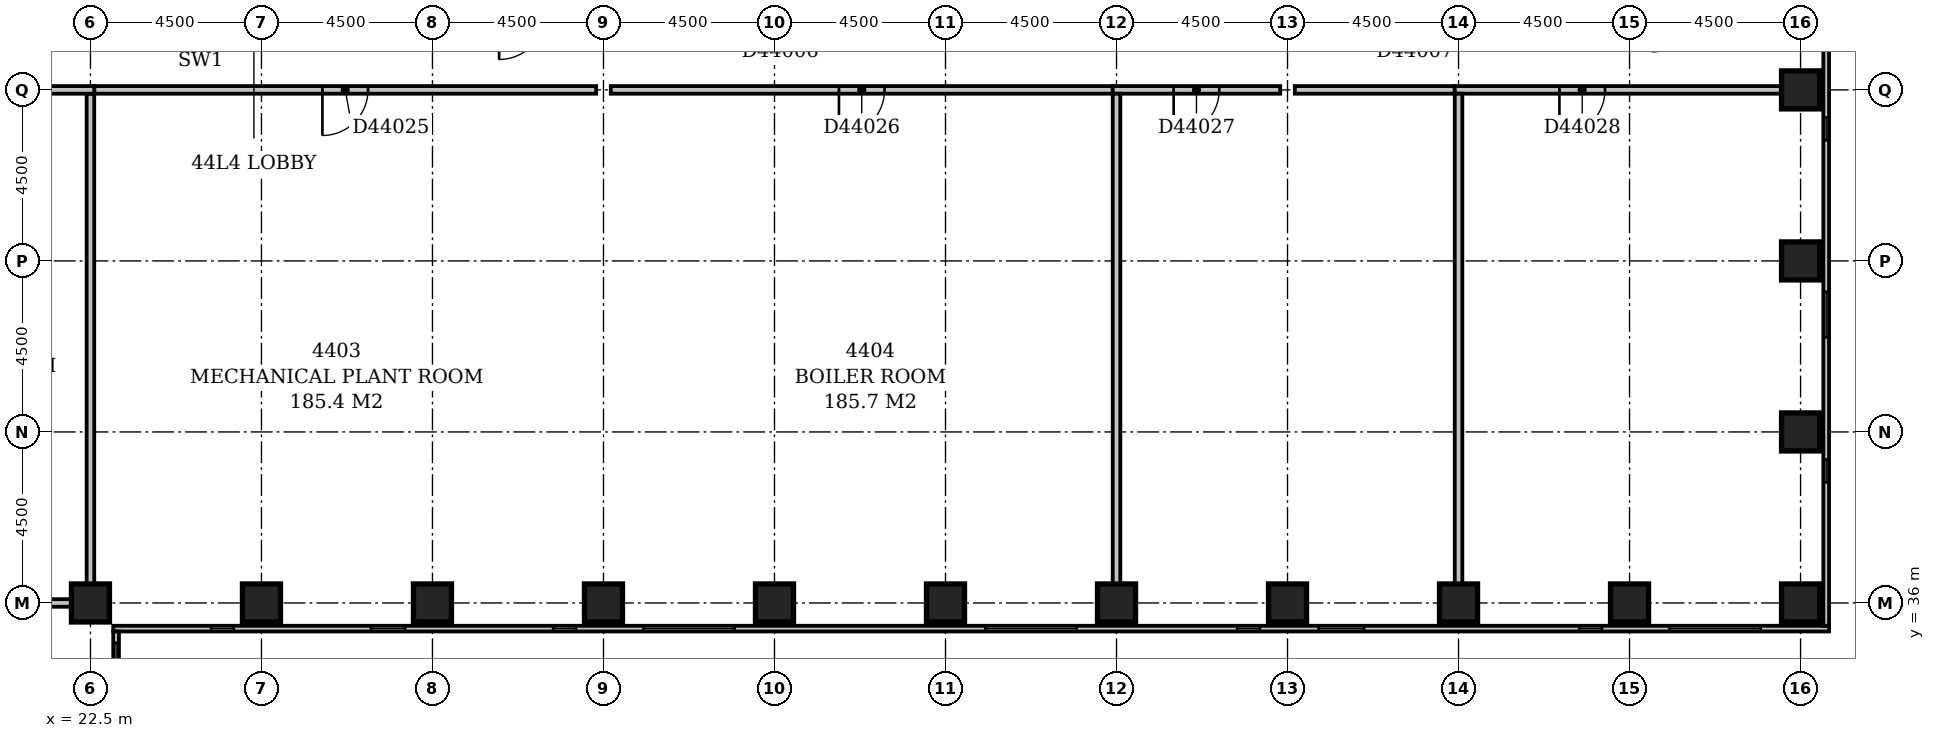
"""IFC4 building model, lengths in metres.
Left out: names, types, materials, properties, quantities, classifications, styles, units other than length and angle.
Written with IfcOpenShell. Run it as: python <this file> out.ifc"""

import sys

from ifc_helpers import new_model, si_unit, direction, frame, frame_2d, origin, origin_2d, place, context, subcontext, project, spatial, rectangle, extrude, element, fill, save


model = new_model("IFC4")
c1 = context("Model", 3, precision=1e-05, world=origin(), true_north=direction((0.0, 1.0)))
c2 = subcontext(c1, "Body", "Model", "MODEL_VIEW")
j1 = project(units=[si_unit("LENGTHUNIT", "METRE"), si_unit("PLANEANGLEUNIT", "RADIAN")], contexts=[c1])
p1 = place(None, origin())
s1 = spatial("IfcSite", under=j1, at=p1, CompositionType="ELEMENT")
p2 = place(p1, origin())
s2 = spatial("IfcBuilding", under=s1, at=p2, CompositionType="ELEMENT")
p3 = place(p2, frame((0.0, 0.0, 173.6)))
s3 = spatial("IfcBuildingStorey", under=s2, at=p3, CompositionType="ELEMENT", Elevation=173.6)
for number, where, z_axis, x_axis in (
    (1, (22.5, 36.0, -0.45), (0.0, 0.0, 1.0), (1.0, 0.0, 0.0)),
    (2, (27.0, 36.0, -0.45), (0.0, 0.0, 1.0), (1.0, 0.0, 0.0)),
    (3, (31.5, 36.0, -0.45), (0.0, 0.0, 1.0), (1.0, 0.0, 0.0)),
    (4, (36.0, 36.0, -0.45), (0.0, 0.0, 1.0), (1.0, 0.0, 0.0)),
    (5, (40.5, 36.0, -0.45), (0.0, 0.0, 1.0), (1.0, 0.0, 0.0)),
    (6, (45.0, 36.0, -0.45), (0.0, 0.0, 1.0), (1.0, 0.0, 0.0)),
    (7, (49.5, 36.0, -0.45), (0.0, 0.0, 1.0), (1.0, 0.0, 0.0)),
    (8, (54.0, 36.0, -0.45), (0.0, 0.0, 1.0), (1.0, 0.0, 0.0)),
    (9, (58.5, 36.0, -0.45), (0.0, 0.0, 1.0), (1.0, 0.0, 0.0)),
    (10, (63.0, 36.0, -0.45), (0.0, 0.0, 1.0), (1.0, 0.0, 0.0)),
    (11, (67.5, 36.0, -0.45), (0.0, 0.0, 1.0), (1.0, 0.0, 0.0)),
    (12, (67.5, 40.5, -0.45), (0.0, 0.0, 1.0), (1.0, 0.0, 0.0)),
    (13, (67.5, 45.0, -0.45), (0.0, 0.0, 1.0), (1.0, 0.0, 0.0)),
    (14, (67.5, 49.5, -0.45), (0.0, 0.0, 1.0), (1.0, 0.0, 0.0)),
):
    element("IfcColumn", number, at=place(p3, frame(where, z_axis=z_axis, x_axis=x_axis)), inside=s3, PredefinedType="COLUMN", context=c2, shape_type="SweptSolid", body=[
        extrude(rectangle(XDim=1.0, YDim=1.0, at=origin_2d()), origin(), (0.0, 0.0, 1.0), 5.55),
    ])
p4 = place(p3, frame((23.175, 17.4, 0.0), z_axis=(0.0, 0.0, 1.0), x_axis=(0.0, 1.0, 0.0)))
e15 = element("IfcWall", 15, at=p4, inside=s3, PredefinedType="STANDARD", context=c2, shape_type="SweptSolid", body=[
    extrude(rectangle(XDim=17.85, YDim=0.15, at=frame_2d((8.925, 0.0))), origin(), (0.0, 0.0, 1.0), 4.5),
])
p5 = place(p4, frame((3.775, 0.0, 0.6)))
e16 = element("IfcOpeningElement", 16, at=p5, cuts=e15, PredefinedType="OPENING", context=c2, shape_type="SweptSolid", body=[
    extrude(rectangle(XDim=0.6, YDim=2.4, at=frame_2d((0.3, 1.2))), frame((0.0, 0.087, 0.0), z_axis=(0.0, -1.0, 0.0), x_axis=(1.0, 0.0, 0.0)), (0.0, 0.0, 1.0), 0.174),
])
p6 = place(p4, frame((5.884, 0.0, 0.6)))
e17 = element("IfcOpeningElement", 17, at=p6, cuts=e15, PredefinedType="OPENING", context=c2, shape_type="SweptSolid", body=[
    extrude(rectangle(XDim=0.9, YDim=2.4, at=frame_2d((0.45, 1.2))), frame((0.0, 0.087, 0.0), z_axis=(0.0, -1.0, 0.0), x_axis=(1.0, 0.0, 0.0)), (0.0, 0.0, 1.0), 0.174),
])
p7 = place(p4, frame((12.775, 0.0, 0.6)))
e18 = element("IfcOpeningElement", 18, at=p7, cuts=e15, PredefinedType="OPENING", context=c2, shape_type="SweptSolid", body=[
    extrude(rectangle(XDim=0.6, YDim=2.4, at=frame_2d((0.3, 1.2))), frame((0.0, 0.087, 0.0), z_axis=(0.0, -1.0, 0.0), x_axis=(1.0, 0.0, 0.0)), (0.0, 0.0, 1.0), 0.174),
])
p8 = place(p4, frame((15.15, 0.0, 0.6)))
e19 = element("IfcOpeningElement", 19, at=p8, cuts=e15, PredefinedType="OPENING", context=c2, shape_type="SweptSolid", body=[
    extrude(rectangle(XDim=2.4, YDim=2.4, at=frame_2d((1.2, 1.2))), frame((0.0, 0.087, 0.0), z_axis=(0.0, -1.0, 0.0), x_axis=(1.0, 0.0, 0.0)), (0.0, 0.0, 1.0), 0.174),
])
p9 = place(p3, frame((23.1, 35.325, 0.0), z_axis=(0.0, 0.0, 1.0), x_axis=(1.0, 0.0, 0.0)))
e20 = element("IfcWall", 20, at=p9, inside=s3, PredefinedType="STANDARD", context=c2, shape_type="SweptSolid", body=[
    extrude(rectangle(XDim=45.15, YDim=0.15, at=frame_2d((22.575, 0.0))), origin(), (0.0, 0.0, 1.0), 4.5),
])
p10 = place(p9, frame((2.575, 0.0, 0.6)))
e21 = element("IfcOpeningElement", 21, at=p10, cuts=e20, PredefinedType="OPENING", context=c2, shape_type="SweptSolid", body=[
    extrude(rectangle(XDim=0.6, YDim=2.4, at=frame_2d((0.3, 1.2))), frame((0.0, 0.087, 0.0), z_axis=(0.0, -1.0, 0.0), x_axis=(1.0, 0.0, 0.0)), (0.0, 0.0, 1.0), 0.174),
])
p11 = place(p9, frame((6.781, 0.0, 0.6)))
e22 = element("IfcOpeningElement", 22, at=p11, cuts=e20, PredefinedType="OPENING", context=c2, shape_type="SweptSolid", body=[
    extrude(rectangle(XDim=0.9, YDim=2.4, at=frame_2d((0.45, 1.2))), frame((0.0, 0.087, 0.0), z_axis=(0.0, -1.0, 0.0), x_axis=(1.0, 0.0, 0.0)), (0.0, 0.0, 1.0), 0.174),
])
p12 = place(p9, frame((11.575, 0.0, 0.6)))
e23 = element("IfcOpeningElement", 23, at=p12, cuts=e20, PredefinedType="OPENING", context=c2, shape_type="SweptSolid", body=[
    extrude(rectangle(XDim=0.6, YDim=2.4, at=frame_2d((0.3, 1.2))), frame((0.0, 0.087, 0.0), z_axis=(0.0, -1.0, 0.0), x_axis=(1.0, 0.0, 0.0)), (0.0, 0.0, 1.0), 0.174),
])
p13 = place(p9, frame((13.95, 0.0, 0.6)))
e24 = element("IfcOpeningElement", 24, at=p13, cuts=e20, PredefinedType="OPENING", context=c2, shape_type="SweptSolid", body=[
    extrude(rectangle(XDim=2.4, YDim=2.4, at=frame_2d((1.2, 1.2))), frame((0.0, 0.087, 0.0), z_axis=(0.0, -1.0, 0.0), x_axis=(1.0, 0.0, 0.0)), (0.0, 0.0, 1.0), 0.174),
])
p14 = place(p9, frame((22.95, 0.0, 0.6)))
e25 = element("IfcOpeningElement", 25, at=p14, cuts=e20, PredefinedType="OPENING", context=c2, shape_type="SweptSolid", body=[
    extrude(rectangle(XDim=2.4, YDim=2.4, at=frame_2d((1.2, 1.2))), frame((0.0, 0.087, 0.0), z_axis=(0.0, -1.0, 0.0), x_axis=(1.0, 0.0, 0.0)), (0.0, 0.0, 1.0), 0.174),
])
p15 = place(p9, frame((29.575, 0.0, 0.6)))
e26 = element("IfcOpeningElement", 26, at=p15, cuts=e20, PredefinedType="OPENING", context=c2, shape_type="SweptSolid", body=[
    extrude(rectangle(XDim=0.6, YDim=2.4, at=frame_2d((0.3, 1.2))), frame((0.0, 0.087, 0.0), z_axis=(0.0, -1.0, 0.0), x_axis=(1.0, 0.0, 0.0)), (0.0, 0.0, 1.0), 0.174),
])
p16 = place(p9, frame((31.716, 0.0, 0.6)))
e27 = element("IfcOpeningElement", 27, at=p16, cuts=e20, PredefinedType="OPENING", context=c2, shape_type="SweptSolid", body=[
    extrude(rectangle(XDim=1.2, YDim=2.4, at=frame_2d((0.6, 1.2))), frame((0.0, 0.087, 0.0), z_axis=(0.0, -1.0, 0.0), x_axis=(1.0, 0.0, 0.0)), (0.0, 0.0, 1.0), 0.174),
])
p17 = place(p9, frame((38.575, 0.0, 0.6)))
e28 = element("IfcOpeningElement", 28, at=p17, cuts=e20, PredefinedType="OPENING", context=c2, shape_type="SweptSolid", body=[
    extrude(rectangle(XDim=0.6, YDim=2.4, at=frame_2d((0.3, 1.2))), frame((0.0, 0.087, 0.0), z_axis=(0.0, -1.0, 0.0), x_axis=(1.0, 0.0, 0.0)), (0.0, 0.0, 1.0), 0.174),
])
p18 = place(p9, frame((40.95, 0.0, 0.6)))
e29 = element("IfcOpeningElement", 29, at=p18, cuts=e20, PredefinedType="OPENING", context=c2, shape_type="SweptSolid", body=[
    extrude(rectangle(XDim=2.4, YDim=2.4, at=frame_2d((1.2, 1.2))), frame((0.0, 0.087, 0.0), z_axis=(0.0, -1.0, 0.0), x_axis=(1.0, 0.0, 0.0)), (0.0, 0.0, 1.0), 0.174),
])
p19 = place(p3, frame((68.175, 35.4, 0.0), z_axis=(0.0, 0.0, 1.0), x_axis=(0.0, 1.0, 0.0)))
e30 = element("IfcWall", 30, at=p19, inside=s3, PredefinedType="STANDARD", context=c2, shape_type="SweptSolid", body=[
    extrude(rectangle(XDim=23.85, YDim=0.15, at=frame_2d((11.925, 0.0))), origin(), (0.0, 0.0, 1.0), 4.5),
])
p20 = place(p19, frame((3.775, 0.0, 0.6)))
e31 = element("IfcOpeningElement", 31, at=p20, cuts=e30, PredefinedType="OPENING", context=c2, shape_type="SweptSolid", body=[
    extrude(rectangle(XDim=0.6, YDim=2.4, at=frame_2d((0.3, 1.2))), frame((0.0, 0.087, 0.0), z_axis=(0.0, -1.0, 0.0), x_axis=(1.0, 0.0, 0.0)), (0.0, 0.0, 1.0), 0.174),
])
p21 = place(p19, frame((7.588, 0.0, 0.6)))
e32 = element("IfcOpeningElement", 32, at=p21, cuts=e30, PredefinedType="OPENING", context=c2, shape_type="SweptSolid", body=[
    extrude(rectangle(XDim=1.2, YDim=2.4, at=frame_2d((0.6, 1.2))), frame((0.0, 0.087, 0.0), z_axis=(0.0, -1.0, 0.0), x_axis=(1.0, 0.0, 0.0)), (0.0, 0.0, 1.0), 0.174),
])
p22 = place(p19, frame((12.775, 0.0, 0.6)))
e33 = element("IfcOpeningElement", 33, at=p22, cuts=e30, PredefinedType="OPENING", context=c2, shape_type="SweptSolid", body=[
    extrude(rectangle(XDim=0.6, YDim=2.4, at=frame_2d((0.3, 1.2))), frame((0.0, 0.087, 0.0), z_axis=(0.0, -1.0, 0.0), x_axis=(1.0, 0.0, 0.0)), (0.0, 0.0, 1.0), 0.174),
])
p23 = place(p19, frame((15.15, 0.0, 0.6)))
e34 = element("IfcOpeningElement", 34, at=p23, cuts=e30, PredefinedType="OPENING", context=c2, shape_type="SweptSolid", body=[
    extrude(rectangle(XDim=2.4, YDim=2.4, at=frame_2d((1.2, 1.2))), frame((0.0, 0.087, 0.0), z_axis=(0.0, -1.0, 0.0), x_axis=(1.0, 0.0, 0.0)), (0.0, 0.0, 1.0), 0.174),
])
p24 = place(p19, frame((21.775, 0.0, 0.6)))
e35 = element("IfcOpeningElement", 35, at=p24, cuts=e30, PredefinedType="OPENING", context=c2, shape_type="SweptSolid", body=[
    extrude(rectangle(XDim=0.6, YDim=2.4, at=frame_2d((0.3, 1.2))), frame((0.0, 0.087, 0.0), z_axis=(0.0, -1.0, 0.0), x_axis=(1.0, 0.0, 0.0)), (0.0, 0.0, 1.0), 0.174),
])
for number, where, z_axis, x_axis in (
    (36, (9.1, 36.0, 0.0), (0.0, 0.0, 1.0), (1.0, 0.0, 0.0)),
    (37, (22.5, 36.191, 0.0), (0.0, 0.0, 1.0), (0.0, 1.0, 0.0)),
):
    element("IfcWall", number, at=place(p3, frame(where, z_axis=z_axis, x_axis=x_axis)), inside=s3, PredefinedType="PARTITIONING", context=c2, shape_type="SweptSolid", body=[
        extrude(rectangle(XDim=13.208, YDim=0.2, at=frame_2d((6.604, 0.0))), origin(), (0.0, 0.0, 1.0), 5.1),
    ])
p25 = place(p3, frame((8.9, 49.5, 0.0), z_axis=(0.0, 0.0, 1.0), x_axis=(1.0, 0.0, 0.0)))
e38 = element("IfcWall", 38, at=p25, inside=s3, PredefinedType="PARTITIONING", context=c2, shape_type="SweptSolid", body=[
    extrude(rectangle(XDim=13.7, YDim=0.2, at=frame_2d((6.85, 0.0))), origin(), (0.0, 0.0, 1.0), 5.1),
])
p26 = place(p25, frame((6.25, 0.0, 0.0)))
e39 = element("IfcOpeningElement", 39, at=p26, cuts=e38, PredefinedType="OPENING", context=c2, shape_type="SweptSolid", body=[
    extrude(rectangle(XDim=1.2, YDim=2.1, at=frame_2d((0.6, 1.05))), frame((0.0, 0.112, 0.0), z_axis=(0.0, -1.0, 0.0), x_axis=(1.0, 0.0, 0.0)), (0.0, 0.0, 1.0), 0.224),
])
p27 = place(p3, frame((22.6, 49.5, 0.0), z_axis=(0.0, 0.0, 1.0), x_axis=(1.0, 0.0, 0.0)))
e40 = element("IfcWall", 40, at=p27, inside=s3, PredefinedType="PARTITIONING", context=c2, shape_type="SweptSolid", body=[
    extrude(rectangle(XDim=13.208, YDim=0.2, at=frame_2d((6.604, 0.0))), origin(), (0.0, 0.0, 1.0), 5.1),
])
p28 = place(p27, frame((6.004, 0.0, 0.0)))
e41 = element("IfcOpeningElement", 41, at=p28, cuts=e40, PredefinedType="OPENING", context=c2, shape_type="SweptSolid", body=[
    extrude(rectangle(XDim=1.2, YDim=2.1, at=frame_2d((0.6, 1.05))), frame((0.0, 0.112, 0.0), z_axis=(0.0, -1.0, 0.0), x_axis=(1.0, 0.0, 0.0)), (0.0, 0.0, 1.0), 0.224),
])
p29 = place(p3, frame((36.192, 49.5, 0.0), z_axis=(0.0, 0.0, 1.0), x_axis=(1.0, 0.0, 0.0)))
e42 = element("IfcWall", 42, at=p29, inside=s3, PredefinedType="PARTITIONING", context=c2, shape_type="SweptSolid", body=[
    extrude(rectangle(XDim=13.208, YDim=0.2, at=frame_2d((6.604, 0.0))), origin(), (0.0, 0.0, 1.0), 5.1),
])
p30 = place(p29, frame((6.004, 0.0, 0.0)))
e43 = element("IfcOpeningElement", 43, at=p30, cuts=e42, PredefinedType="OPENING", context=c2, shape_type="SweptSolid", body=[
    extrude(rectangle(XDim=1.2, YDim=2.1, at=frame_2d((0.6, 1.05))), frame((0.0, 0.112, 0.0), z_axis=(0.0, -1.0, 0.0), x_axis=(1.0, 0.0, 0.0)), (0.0, 0.0, 1.0), 0.224),
])
p31 = place(p3, frame((49.5, 49.4, 0.0), z_axis=(0.0, 0.0, 1.0), x_axis=(0.0, -1.0, 0.0)))
e44 = element("IfcWall", 44, at=p31, inside=s3, PredefinedType="PARTITIONING", context=c2, shape_type="SweptSolid", body=[
    extrude(rectangle(XDim=13.208, YDim=0.2, at=frame_2d((6.604, 0.0))), origin(), (0.0, 0.0, 1.0), 5.1),
])
p32 = place(p3, frame((49.4, 49.5, 0.0), z_axis=(0.0, 0.0, 1.0), x_axis=(1.0, 0.0, 0.0)))
e45 = element("IfcWall", 45, at=p32, inside=s3, PredefinedType="PARTITIONING", context=c2, shape_type="SweptSolid", body=[
    extrude(rectangle(XDim=4.408, YDim=0.2, at=frame_2d((2.204, 0.0))), origin(), (0.0, 0.0, 1.0), 5.1),
])
p33 = place(p32, frame((1.604, 0.0, 0.0)))
e46 = element("IfcOpeningElement", 46, at=p33, cuts=e45, PredefinedType="OPENING", context=c2, shape_type="SweptSolid", body=[
    extrude(rectangle(XDim=1.2, YDim=2.1, at=frame_2d((0.6, 1.05))), frame((0.0, 0.112, 0.0), z_axis=(0.0, -1.0, 0.0), x_axis=(1.0, 0.0, 0.0)), (0.0, 0.0, 1.0), 0.224),
])
p34 = place(p3, frame((54.192, 49.5, 0.0), z_axis=(0.0, 0.0, 1.0), x_axis=(1.0, 0.0, 0.0)))
e47 = element("IfcWall", 47, at=p34, inside=s3, PredefinedType="PARTITIONING", context=c2, shape_type="SweptSolid", body=[
    extrude(rectangle(XDim=4.208, YDim=0.2, at=frame_2d((2.104, 0.0))), origin(), (0.0, 0.0, 1.0), 5.1),
])
p35 = place(p3, frame((58.5, 49.4, 0.0), z_axis=(0.0, 0.0, 1.0), x_axis=(0.0, -1.0, 0.0)))
e48 = element("IfcWall", 48, at=p35, inside=s3, PredefinedType="PARTITIONING", context=c2, shape_type="SweptSolid", body=[
    extrude(rectangle(XDim=13.208, YDim=0.2, at=frame_2d((6.604, 0.0))), origin(), (0.0, 0.0, 1.0), 5.1),
])
p36 = place(p3, frame((58.4, 49.5, 0.0), z_axis=(0.0, 0.0, 1.0), x_axis=(1.0, 0.0, 0.0)))
e49 = element("IfcWall", 49, at=p36, inside=s3, PredefinedType="PARTITIONING", context=c2, shape_type="SweptSolid", body=[
    extrude(rectangle(XDim=8.909, YDim=0.2, at=frame_2d((4.454, 0.0))), origin(), (0.0, 0.0, 1.0), 5.1),
])
p37 = place(p36, frame((2.754, 0.0, 0.0)))
e50 = element("IfcOpeningElement", 50, at=p37, cuts=e49, PredefinedType="OPENING", context=c2, shape_type="SweptSolid", body=[
    extrude(rectangle(XDim=1.2, YDim=2.1, at=frame_2d((0.6, 1.05))), frame((0.0, 0.112, 0.0), z_axis=(0.0, -1.0, 0.0), x_axis=(1.0, 0.0, 0.0)), (0.0, 0.0, 1.0), 0.224),
])
p38 = place(p8, origin())
e51 = element("IfcWindow", 51, at=p38, inside=s3, PartitioningType="SINGLE_PANEL", PredefinedType="USERDEFINED", context=c2, shape_type="SweptSolid", body=[
    extrude(rectangle(XDim=2.4, YDim=2.4, at=frame_2d((1.2, 1.2))), frame((0.0, 0.03, 0.0), z_axis=(0.0, -1.0, 0.0), x_axis=(1.0, 0.0, 0.0)), (0.0, 0.0, 1.0), 0.06),
])
fill(e19, e51)
p39 = place(p10, origin())
e52 = element("IfcWindow", 52, at=p39, inside=s3, PartitioningType="SINGLE_PANEL", PredefinedType="USERDEFINED", context=c2, shape_type="SweptSolid", body=[
    extrude(rectangle(XDim=0.6, YDim=2.4, at=frame_2d((0.3, 1.2))), frame((0.0, 0.03, 0.0), z_axis=(0.0, -1.0, 0.0), x_axis=(1.0, 0.0, 0.0)), (0.0, 0.0, 1.0), 0.06),
])
fill(e21, e52)
p40 = place(p11, origin())
e53 = element("IfcWindow", 53, at=p40, inside=s3, PartitioningType="SINGLE_PANEL", PredefinedType="USERDEFINED", context=c2, shape_type="SweptSolid", body=[
    extrude(rectangle(XDim=0.9, YDim=2.4, at=frame_2d((0.45, 1.2))), frame((0.0, 0.03, 0.0), z_axis=(0.0, -1.0, 0.0), x_axis=(1.0, 0.0, 0.0)), (0.0, 0.0, 1.0), 0.06),
])
fill(e22, e53)
p41 = place(p12, origin())
e54 = element("IfcWindow", 54, at=p41, inside=s3, PartitioningType="SINGLE_PANEL", PredefinedType="USERDEFINED", context=c2, shape_type="SweptSolid", body=[
    extrude(rectangle(XDim=0.6, YDim=2.4, at=frame_2d((0.3, 1.2))), frame((0.0, 0.03, 0.0), z_axis=(0.0, -1.0, 0.0), x_axis=(1.0, 0.0, 0.0)), (0.0, 0.0, 1.0), 0.06),
])
fill(e23, e54)
p42 = place(p13, origin())
e55 = element("IfcWindow", 55, at=p42, inside=s3, PartitioningType="SINGLE_PANEL", PredefinedType="USERDEFINED", context=c2, shape_type="SweptSolid", body=[
    extrude(rectangle(XDim=2.4, YDim=2.4, at=frame_2d((1.2, 1.2))), frame((0.0, 0.03, 0.0), z_axis=(0.0, -1.0, 0.0), x_axis=(1.0, 0.0, 0.0)), (0.0, 0.0, 1.0), 0.06),
])
fill(e24, e55)
p43 = place(p14, origin())
e56 = element("IfcWindow", 56, at=p43, inside=s3, PartitioningType="SINGLE_PANEL", PredefinedType="USERDEFINED", context=c2, shape_type="SweptSolid", body=[
    extrude(rectangle(XDim=2.4, YDim=2.4, at=frame_2d((1.2, 1.2))), frame((0.0, 0.03, 0.0), z_axis=(0.0, -1.0, 0.0), x_axis=(1.0, 0.0, 0.0)), (0.0, 0.0, 1.0), 0.06),
])
fill(e25, e56)
p44 = place(p15, origin())
e57 = element("IfcWindow", 57, at=p44, inside=s3, PartitioningType="SINGLE_PANEL", PredefinedType="USERDEFINED", context=c2, shape_type="SweptSolid", body=[
    extrude(rectangle(XDim=0.6, YDim=2.4, at=frame_2d((0.3, 1.2))), frame((0.0, 0.03, 0.0), z_axis=(0.0, -1.0, 0.0), x_axis=(1.0, 0.0, 0.0)), (0.0, 0.0, 1.0), 0.06),
])
fill(e26, e57)
p45 = place(p16, origin())
e58 = element("IfcWindow", 58, at=p45, inside=s3, PartitioningType="SINGLE_PANEL", PredefinedType="USERDEFINED", context=c2, shape_type="SweptSolid", body=[
    extrude(rectangle(XDim=1.2, YDim=2.4, at=frame_2d((0.6, 1.2))), frame((0.0, 0.03, 0.0), z_axis=(0.0, -1.0, 0.0), x_axis=(1.0, 0.0, 0.0)), (0.0, 0.0, 1.0), 0.06),
])
fill(e27, e58)
p46 = place(p17, origin())
e59 = element("IfcWindow", 59, at=p46, inside=s3, PartitioningType="SINGLE_PANEL", PredefinedType="USERDEFINED", context=c2, shape_type="SweptSolid", body=[
    extrude(rectangle(XDim=0.6, YDim=2.4, at=frame_2d((0.3, 1.2))), frame((0.0, 0.03, 0.0), z_axis=(0.0, -1.0, 0.0), x_axis=(1.0, 0.0, 0.0)), (0.0, 0.0, 1.0), 0.06),
])
fill(e28, e59)
p47 = place(p18, origin())
e60 = element("IfcWindow", 60, at=p47, inside=s3, PartitioningType="SINGLE_PANEL", PredefinedType="USERDEFINED", context=c2, shape_type="SweptSolid", body=[
    extrude(rectangle(XDim=2.4, YDim=2.4, at=frame_2d((1.2, 1.2))), frame((0.0, 0.03, 0.0), z_axis=(0.0, -1.0, 0.0), x_axis=(1.0, 0.0, 0.0)), (0.0, 0.0, 1.0), 0.06),
])
fill(e29, e60)
p48 = place(p20, origin())
e61 = element("IfcWindow", 61, at=p48, inside=s3, PartitioningType="SINGLE_PANEL", PredefinedType="USERDEFINED", context=c2, shape_type="SweptSolid", body=[
    extrude(rectangle(XDim=0.6, YDim=2.4, at=frame_2d((0.3, 1.2))), frame((0.0, 0.03, 0.0), z_axis=(0.0, -1.0, 0.0), x_axis=(1.0, 0.0, 0.0)), (0.0, 0.0, 1.0), 0.06),
])
fill(e31, e61)
p49 = place(p21, origin())
e62 = element("IfcWindow", 62, at=p49, inside=s3, PartitioningType="SINGLE_PANEL", PredefinedType="USERDEFINED", context=c2, shape_type="SweptSolid", body=[
    extrude(rectangle(XDim=1.2, YDim=2.4, at=frame_2d((0.6, 1.2))), frame((0.0, 0.03, 0.0), z_axis=(0.0, -1.0, 0.0), x_axis=(1.0, 0.0, 0.0)), (0.0, 0.0, 1.0), 0.06),
])
fill(e32, e62)
p50 = place(p22, origin())
e63 = element("IfcWindow", 63, at=p50, inside=s3, PartitioningType="SINGLE_PANEL", PredefinedType="USERDEFINED", context=c2, shape_type="SweptSolid", body=[
    extrude(rectangle(XDim=0.6, YDim=2.4, at=frame_2d((0.3, 1.2))), frame((0.0, 0.03, 0.0), z_axis=(0.0, -1.0, 0.0), x_axis=(1.0, 0.0, 0.0)), (0.0, 0.0, 1.0), 0.06),
])
fill(e33, e63)
p51 = place(p28, frame((1.2, 0.0, 0.0), z_axis=(0.0, 0.0, 1.0), x_axis=(-1.0, 0.0, 0.0)))
e64 = element("IfcDoor", 64, at=p51, inside=s3, OperationType="SINGLE_SWING_RIGHT", PredefinedType="DOOR", context=c2, shape_type="SweptSolid", body=[
    extrude(rectangle(XDim=1.2, YDim=2.1, at=frame_2d((0.6, 1.05))), frame((0.0, 0.025, 0.0), z_axis=(0.0, -1.0, 0.0), x_axis=(1.0, 0.0, 0.0)), (0.0, 0.0, 1.0), 0.05),
])
fill(e41, e64)
p52 = place(p30, frame((1.2, 0.0, 0.0), z_axis=(0.0, 0.0, 1.0), x_axis=(-1.0, 0.0, 0.0)))
e65 = element("IfcDoor", 65, at=p52, inside=s3, OperationType="SINGLE_SWING_RIGHT", PredefinedType="DOOR", context=c2, shape_type="SweptSolid", body=[
    extrude(rectangle(XDim=1.2, YDim=2.1, at=frame_2d((0.6, 1.05))), frame((0.0, 0.025, 0.0), z_axis=(0.0, -1.0, 0.0), x_axis=(1.0, 0.0, 0.0)), (0.0, 0.0, 1.0), 0.05),
])
fill(e43, e65)
p53 = place(p33, frame((1.2, 0.0, 0.0), z_axis=(0.0, 0.0, 1.0), x_axis=(-1.0, 0.0, 0.0)))
e66 = element("IfcDoor", 66, at=p53, inside=s3, OperationType="SINGLE_SWING_RIGHT", PredefinedType="DOOR", context=c2, shape_type="SweptSolid", body=[
    extrude(rectangle(XDim=1.2, YDim=2.1, at=frame_2d((0.6, 1.05))), frame((0.0, 0.025, 0.0), z_axis=(0.0, -1.0, 0.0), x_axis=(1.0, 0.0, 0.0)), (0.0, 0.0, 1.0), 0.05),
])
fill(e46, e66)
p54 = place(p37, frame((1.2, 0.0, 0.0), z_axis=(0.0, 0.0, 1.0), x_axis=(-1.0, 0.0, 0.0)))
e67 = element("IfcDoor", 67, at=p54, inside=s3, OperationType="SINGLE_SWING_RIGHT", PredefinedType="DOOR", context=c2, shape_type="SweptSolid", body=[
    extrude(rectangle(XDim=1.2, YDim=2.1, at=frame_2d((0.6, 1.05))), frame((0.0, 0.025, 0.0), z_axis=(0.0, -1.0, 0.0), x_axis=(1.0, 0.0, 0.0)), (0.0, 0.0, 1.0), 0.05),
])
fill(e50, e67)
save(model, sys.argv[1])
